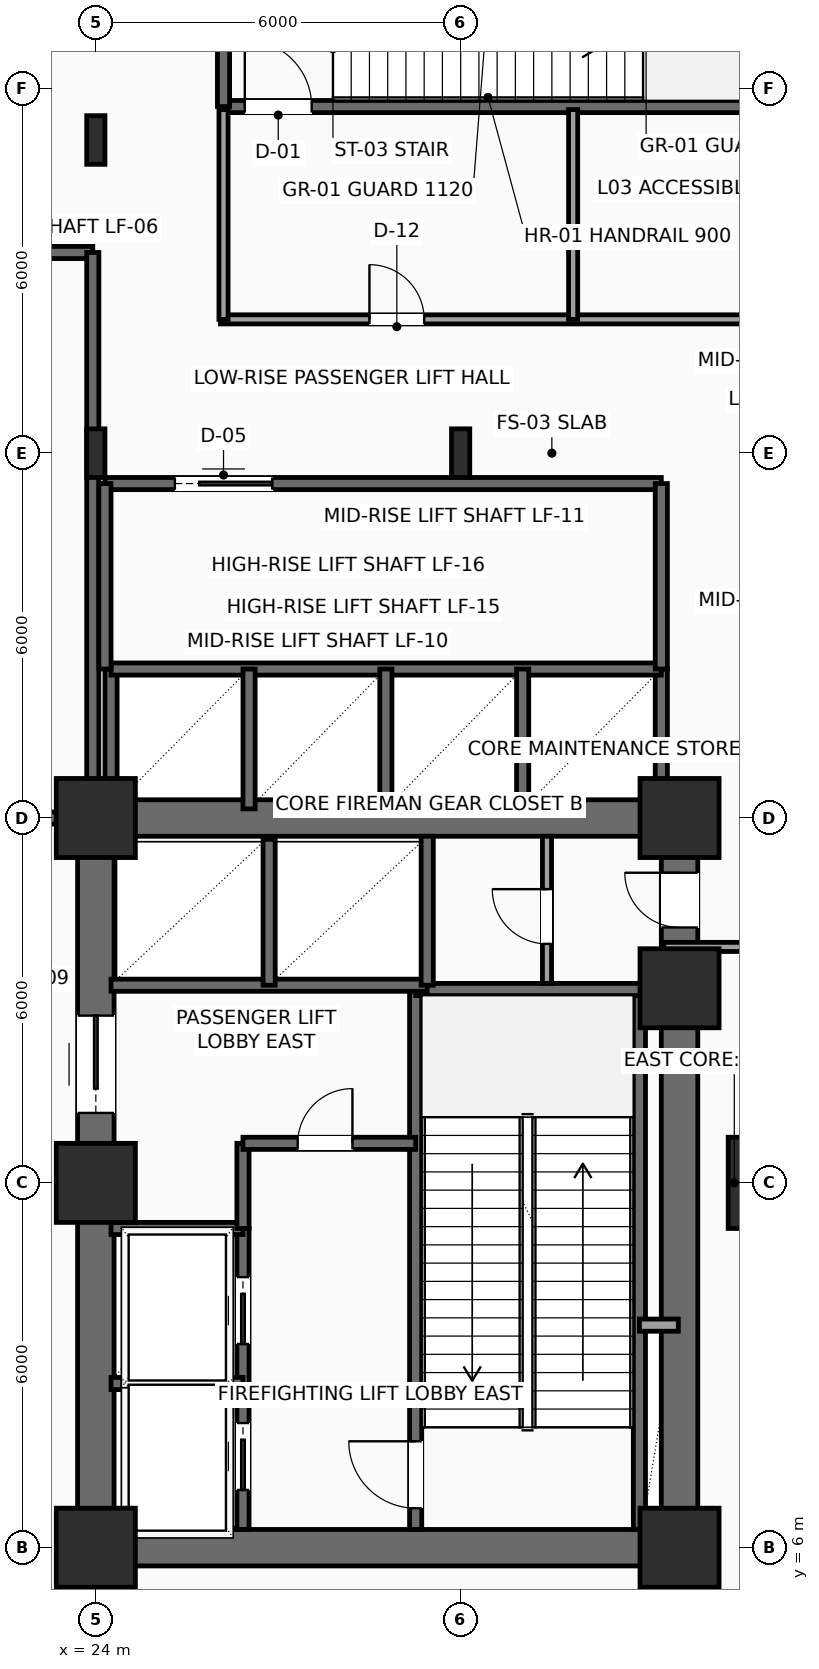
"""IFC4 building model, lengths in metres.
Left out: names, types, materials, properties, quantities, classifications, styles, units other than length and angle.
Written with IfcOpenShell. Run it as: python <this file> out.ifc"""

import sys

from ifc_helpers import new_model, si_unit, direction, frame, frame_2d, origin, origin_2d, place, context, subcontext, project, spatial, rectangle, i_section, extrude, element, fill, save


model = new_model("IFC4")
c1 = context("Model", 3, precision=1e-05, world=origin(), true_north=direction((0.0, 1.0)))
c2 = subcontext(c1, "Body", "Model", "MODEL_VIEW")
j1 = project(units=[si_unit("LENGTHUNIT", "METRE"), si_unit("PLANEANGLEUNIT", "RADIAN")], contexts=[c1])
p1 = place(None, origin())
s1 = spatial("IfcSite", under=j1, at=p1, CompositionType="ELEMENT")
p2 = place(p1, origin())
s2 = spatial("IfcBuilding", under=s1, at=p2, CompositionType="ELEMENT")
p3 = place(p2, frame((0.0, 0.0, 16.5)))
s3 = spatial("IfcBuildingStorey", under=s2, at=p3, CompositionType="ELEMENT", Elevation=16.5)
for number, where, z_axis, x_axis in (
    (1, (24.0, 6.0, 0.0), (0.0, 0.0, 1.0), (1.0, 0.0, 0.0)),
    (2, (24.0, 12.0, 0.0), (0.0, 0.0, 1.0), (1.0, 0.0, 0.0)),
    (3, (24.0, 18.0, 0.0), (0.0, 0.0, 1.0), (1.0, 0.0, 0.0)),
    (4, (33.6, 6.0, 0.0), (0.0, 0.0, 1.0), (1.0, 0.0, 0.0)),
    (5, (33.6, 15.2, 0.0), (0.0, 0.0, 1.0), (1.0, 0.0, 0.0)),
    (6, (33.6, 18.0, 0.0), (0.0, 0.0, 1.0), (1.0, 0.0, 0.0)),
):
    element("IfcColumn", number, at=place(p3, frame(where, z_axis=z_axis, x_axis=x_axis)), inside=s3, PredefinedType="COLUMN", context=c2, shape_type="SweptSolid", body=[
        extrude(rectangle(XDim=1.3, YDim=1.3, at=origin_2d()), origin(), (0.0, 0.0, 1.0), 5.4),
    ])
for number, where, z_axis, x_axis in (
    (7, (24.0, 24.0, 0.0), (0.0, 0.0, 1.0), (1.0, 0.0, 0.0)),
    (8, (24.0, 29.15, 0.0), (0.0, 0.0, 1.0), (1.0, 0.0, 0.0)),
    (9, (30.0, 24.0, 0.0), (0.0, 0.0, 1.0), (1.0, 0.0, 0.0)),
):
    element("IfcColumn", number, at=place(p3, frame(where, z_axis=z_axis, x_axis=x_axis)), inside=s3, PredefinedType="COLUMN", context=c2, shape_type="SweptSolid", body=[
        extrude(i_section(OverallWidth=0.3, OverallDepth=0.8, WebThickness=0.018, FlangeThickness=0.033, FilletRadius=0.03, at=origin_2d()), origin(), (0.0, 0.0, 1.0), 5.4),
    ])
p4 = place(p3, frame((35.15, 12.0, 0.0), z_axis=(0.0, 0.0, 1.0), x_axis=(1.0, 0.0, 0.0)))
e10 = element("IfcColumn", 10, at=p4, inside=s3, PredefinedType="COLUMN", context=c2, shape_type="SweptSolid", body=[
    extrude(rectangle(XDim=1.5, YDim=1.5, at=origin_2d()), origin(), (0.0, 0.0, 1.0), 5.4),
])
for number, where, z_axis, x_axis in (
    (11, (24.0, 6.0, 0.0), (0.0, 0.0, 1.0), (1.0, 0.0, 0.0)),
    (12, (24.0, 18.0, 0.0), (0.0, 0.0, 1.0), (1.0, 0.0, 0.0)),
):
    element("IfcWall", number, at=place(p3, frame(where, z_axis=z_axis, x_axis=x_axis)), inside=s3, PredefinedType="SHEAR", context=c2, shape_type="SweptSolid", body=[
        extrude(rectangle(XDim=9.6, YDim=0.6, at=frame_2d((4.8, 0.0))), origin(), (0.0, 0.0, 1.0), 5.125),
    ])
p5 = place(p3, frame((24.0, 6.0, 0.0), z_axis=(0.0, 0.0, 1.0), x_axis=(0.0, 1.0, 0.0)))
e13 = element("IfcWall", 13, at=p5, inside=s3, PredefinedType="SHEAR", context=c2, shape_type="SweptSolid", body=[
    extrude(rectangle(XDim=12.0, YDim=0.6, at=frame_2d((6.0, 0.0))), origin(), (0.0, 0.0, 1.0), 5.125),
])
p6 = place(p5, frame((7.15, 0.0, 0.0)))
e14 = element("IfcOpeningElement", 14, at=p6, cuts=e13, PredefinedType="OPENING", context=c2, shape_type="SweptSolid", body=[
    extrude(rectangle(XDim=1.6, YDim=2.3, at=frame_2d((0.8, 1.15))), frame((0.0, 0.31, 0.0), z_axis=(0.0, -1.0, 0.0), x_axis=(1.0, 0.0, 0.0)), (0.0, 0.0, 1.0), 0.62),
])
p7 = place(p3, frame((33.6, 6.0, 0.0), z_axis=(0.0, 0.0, 1.0), x_axis=(0.0, 1.0, 0.0)))
e15 = element("IfcWall", 15, at=p7, inside=s3, PredefinedType="SHEAR", context=c2, shape_type="SweptSolid", body=[
    extrude(rectangle(XDim=12.0, YDim=0.6, at=frame_2d((6.0, 0.0))), origin(), (0.0, 0.0, 1.0), 5.125),
])
p8 = place(p7, frame((10.2, 0.0, 0.0)))
e16 = element("IfcOpeningElement", 16, at=p8, cuts=e15, PredefinedType="OPENING", context=c2, shape_type="SweptSolid", body=[
    extrude(rectangle(XDim=0.9, YDim=2.15, at=frame_2d((0.45, 1.075))), frame((0.0, 0.31, 0.0), z_axis=(0.0, -1.0, 0.0), x_axis=(1.0, 0.0, 0.0)), (0.0, 0.0, 1.0), 0.62),
])
p9 = place(p3, frame((29.26, 6.3, 0.0), z_axis=(0.0, 0.0, 1.0), x_axis=(0.0, 1.0, 0.0)))
e17 = element("IfcWall", 17, at=p9, inside=s3, PredefinedType="SHEAR", context=c2, shape_type="SweptSolid", body=[
    extrude(rectangle(XDim=8.88, YDim=0.2, at=frame_2d((4.44, 0.0))), origin(), (0.0, 0.0, 1.0), 5.125),
])
p10 = place(p9, frame((0.35, 0.0, 0.0)))
e18 = element("IfcOpeningElement", 18, at=p10, cuts=e17, PredefinedType="OPENING", context=c2, shape_type="SweptSolid", body=[
    extrude(rectangle(XDim=1.1, YDim=2.2, at=frame_2d((0.55, 1.1))), frame((0.0, 0.11, 0.0), z_axis=(0.0, -1.0, 0.0), x_axis=(1.0, 0.0, 0.0)), (0.0, 0.0, 1.0), 0.22),
])
p11 = place(p3, frame((32.94, 6.3, 0.0), z_axis=(0.0, 0.0, 1.0), x_axis=(0.0, 1.0, 0.0)))
e19 = element("IfcWall", 19, at=p11, inside=s3, PredefinedType="SHEAR", context=c2, shape_type="SweptSolid", body=[
    extrude(rectangle(XDim=8.88, YDim=0.2, at=frame_2d((4.44, 0.0))), origin(), (0.0, 0.0, 1.0), 5.125),
])
p12 = place(p3, frame((29.26, 15.18, 0.0), z_axis=(0.0, 0.0, 1.0), x_axis=(1.0, 0.0, 0.0)))
e20 = element("IfcWall", 20, at=p12, inside=s3, PredefinedType="SHEAR", context=c2, shape_type="SweptSolid", body=[
    extrude(rectangle(XDim=4.04, YDim=0.2, at=frame_2d((2.02, 0.0))), origin(), (0.0, 0.0, 1.0), 5.125),
])
p13 = place(p3, frame((26.42, 6.3, 0.0), z_axis=(0.0, 0.0, 1.0), x_axis=(0.0, 1.0, 0.0)))
e21 = element("IfcWall", 21, at=p13, inside=s3, PredefinedType="SHEAR", context=c2, shape_type="SweptSolid", body=[
    extrude(rectangle(XDim=4.95, YDim=0.2, at=frame_2d((2.475, 0.0))), origin(), (0.0, 0.0, 1.0), 5.125),
])
p14 = place(p13, frame((0.65, 0.0, 0.0)))
e22 = element("IfcOpeningElement", 22, at=p14, cuts=e21, PredefinedType="OPENING", context=c2, shape_type="SweptSolid", body=[
    extrude(rectangle(XDim=1.1, YDim=2.2, at=frame_2d((0.55, 1.1))), frame((0.0, 0.11, 0.0), z_axis=(0.0, -1.0, 0.0), x_axis=(1.0, 0.0, 0.0)), (0.0, 0.0, 1.0), 0.22),
])
p15 = place(p13, frame((3.05, 0.0, 0.0)))
e23 = element("IfcOpeningElement", 23, at=p15, cuts=e21, PredefinedType="OPENING", context=c2, shape_type="SweptSolid", body=[
    extrude(rectangle(XDim=1.1, YDim=2.2, at=frame_2d((0.55, 1.1))), frame((0.0, 0.11, 0.0), z_axis=(0.0, -1.0, 0.0), x_axis=(1.0, 0.0, 0.0)), (0.0, 0.0, 1.0), 0.22),
])
for number, where, z_axis, x_axis in (
    (24, (24.25, 8.7, 0.0), (0.0, 0.0, 1.0), (1.0, 0.0, 0.0)),
    (25, (24.25, 11.25, 0.0), (0.0, 0.0, 1.0), (1.0, 0.0, 0.0)),
):
    element("IfcWall", number, at=place(p3, frame(where, z_axis=z_axis, x_axis=x_axis)), inside=s3, PredefinedType="SHEAR", context=c2, shape_type="SweptSolid", body=[
        extrude(rectangle(XDim=2.17, YDim=0.2, at=frame_2d((1.085, 0.0))), origin(), (0.0, 0.0, 1.0), 5.125),
    ])
p16 = place(p3, frame((26.42, 11.25, 0.0), z_axis=(0.0, 0.0, 1.0), x_axis=(0.0, 1.0, 0.0)))
e26 = element("IfcWall", 26, at=p16, inside=s3, PredefinedType="SHEAR", context=c2, shape_type="SweptSolid", body=[
    extrude(rectangle(XDim=1.4, YDim=0.2, at=frame_2d((0.7, 0.0))), origin(), (0.0, 0.0, 1.0), 5.125),
])
p17 = place(p3, frame((26.42, 12.65, 0.0), z_axis=(0.0, 0.0, 1.0), x_axis=(1.0, 0.0, 0.0)))
e27 = element("IfcWall", 27, at=p17, inside=s3, PredefinedType="SHEAR", context=c2, shape_type="SweptSolid", body=[
    extrude(rectangle(XDim=2.84, YDim=0.2, at=frame_2d((1.42, 0.0))), origin(), (0.0, 0.0, 1.0), 5.125),
])
p18 = place(p17, frame((0.9, 0.0, 0.0)))
e28 = element("IfcOpeningElement", 28, at=p18, cuts=e27, PredefinedType="OPENING", context=c2, shape_type="SweptSolid", body=[
    extrude(rectangle(XDim=0.9, YDim=2.15, at=frame_2d((0.45, 1.075))), frame((0.0, 0.11, 0.0), z_axis=(0.0, -1.0, 0.0), x_axis=(1.0, 0.0, 0.0)), (0.0, 0.0, 1.0), 0.22),
])
p19 = place(p3, frame((32.94, 9.66, 0.0), z_axis=(0.0, 0.0, 1.0), x_axis=(1.0, 0.0, 0.0)))
e29 = element("IfcWall", 29, at=p19, inside=s3, PredefinedType="SOLIDWALL", context=c2, shape_type="SweptSolid", body=[
    extrude(rectangle(XDim=0.64, YDim=0.2, at=frame_2d((0.32, 0.0))), origin(), (0.0, 0.0, 1.0), 5.125),
])
p20 = place(p3, frame((24.25, 15.25, 0.0), z_axis=(0.0, 0.0, 1.0), x_axis=(1.0, 0.0, 0.0)))
e30 = element("IfcWall", 30, at=p20, inside=s3, PredefinedType="SHEAR", context=c2, shape_type="SweptSolid", body=[
    extrude(rectangle(XDim=5.2, YDim=0.2, at=frame_2d((2.6, 0.0))), origin(), (0.0, 0.0, 1.0), 5.125),
])
p21 = place(p3, frame((26.85, 15.25, 0.0), z_axis=(0.0, 0.0, 1.0), x_axis=(0.0, 1.0, 0.0)))
e31 = element("IfcWall", 31, at=p21, inside=s3, PredefinedType="SHEAR", context=c2, shape_type="SweptSolid", body=[
    extrude(rectangle(XDim=2.4, YDim=0.2, at=frame_2d((1.2, 0.0))), origin(), (0.0, 0.0, 1.0), 5.125),
])
p22 = place(p3, frame((29.45, 15.25, 0.0), z_axis=(0.0, 0.0, 1.0), x_axis=(0.0, 1.0, 0.0)))
e32 = element("IfcWall", 32, at=p22, inside=s3, PredefinedType="SHEAR", context=c2, shape_type="SweptSolid", body=[
    extrude(rectangle(XDim=2.45, YDim=0.2, at=frame_2d((1.225, 0.0))), origin(), (0.0, 0.0, 1.0), 5.125),
])
p23 = place(p3, frame((31.42, 15.28, 0.0), z_axis=(0.0, 0.0, 1.0), x_axis=(0.0, 1.0, 0.0)))
e33 = element("IfcWall", 33, at=p23, inside=s3, PredefinedType="PARTITIONING", context=c2, shape_type="SweptSolid", body=[
    extrude(rectangle(XDim=2.42, YDim=0.15, at=frame_2d((1.21, 0.0))), origin(), (0.0, 0.0, 1.0), 5.125),
])
p24 = place(p23, frame((0.65, 0.0, 0.0)))
e34 = element("IfcOpeningElement", 34, at=p24, cuts=e33, PredefinedType="OPENING", context=c2, shape_type="SweptSolid", body=[
    extrude(rectangle(XDim=0.9, YDim=2.15, at=frame_2d((0.45, 1.075))), frame((0.0, 0.085, 0.0), z_axis=(0.0, -1.0, 0.0), x_axis=(1.0, 0.0, 0.0)), (0.0, 0.0, 1.0), 0.17),
])
p25 = place(p3, frame((20.45, 18.0, 0.0), z_axis=(0.0, 0.0, 1.0), x_axis=(1.0, 0.0, 0.0)))
e35 = element("IfcWall", 35, at=p25, inside=s3, PredefinedType="SHEAR", context=c2, shape_type="SweptSolid", body=[
    extrude(rectangle(XDim=3.5, YDim=0.2, at=frame_2d((1.75, 0.0))), origin(), (0.0, 0.0, 1.0), 5.125),
])
p26 = place(p25, frame((0.95, 0.0, 0.0)))
e36 = element("IfcOpeningElement", 36, at=p26, cuts=e35, PredefinedType="OPENING", context=c2, shape_type="SweptSolid", body=[
    extrude(rectangle(XDim=1.6, YDim=2.3, at=frame_2d((0.8, 1.15))), frame((0.0, 0.11, 0.0), z_axis=(0.0, -1.0, 0.0), x_axis=(1.0, 0.0, 0.0)), (0.0, 0.0, 1.0), 0.22),
])
p27 = place(p3, frame((20.45, 27.3, 0.0), z_axis=(0.0, 0.0, 1.0), x_axis=(1.0, 0.0, 0.0)))
e37 = element("IfcWall", 37, at=p27, inside=s3, PredefinedType="SHEAR", context=c2, shape_type="SweptSolid", body=[
    extrude(rectangle(XDim=3.5, YDim=0.2, at=frame_2d((1.75, 0.0))), origin(), (0.0, 0.0, 1.0), 5.125),
])
p28 = place(p3, frame((23.95, 18.0, 0.0), z_axis=(0.0, 0.0, 1.0), x_axis=(0.0, 1.0, 0.0)))
e38 = element("IfcWall", 38, at=p28, inside=s3, PredefinedType="SHEAR", context=c2, shape_type="SweptSolid", body=[
    extrude(rectangle(XDim=9.3, YDim=0.2, at=frame_2d((4.65, 0.0))), origin(), (0.0, 0.0, 1.0), 5.125),
])
for number, where, z_axis, x_axis in (
    (39, (33.3, 18.1, 0.0), (0.0, 0.0, 1.0), (0.0, 1.0, 0.0)),
    (40, (24.25, 18.1, 0.0), (0.0, 0.0, 1.0), (0.0, 1.0, 0.0)),
):
    element("IfcWall", number, at=place(p3, frame(where, z_axis=z_axis, x_axis=x_axis)), inside=s3, PredefinedType="SHEAR", context=c2, shape_type="SweptSolid", body=[
        extrude(rectangle(XDim=2.35, YDim=0.2, at=frame_2d((1.175, 0.0))), origin(), (0.0, 0.0, 1.0), 5.125),
    ])
p29 = place(p3, frame((24.25, 20.45, 0.0), z_axis=(0.0, 0.0, 1.0), x_axis=(1.0, 0.0, 0.0)))
e41 = element("IfcWall", 41, at=p29, inside=s3, PredefinedType="SHEAR", context=c2, shape_type="SweptSolid", body=[
    extrude(rectangle(XDim=9.05, YDim=0.2, at=frame_2d((4.525, 0.0))), origin(), (0.0, 0.0, 1.0), 5.125),
])
for number, where, z_axis, x_axis in (
    (42, (26.52, 18.15, 0.0), (0.0, 0.0, 1.0), (0.0, 1.0, 0.0)),
    (43, (28.77, 18.15, 0.0), (0.0, 0.0, 1.0), (0.0, 1.0, 0.0)),
    (44, (31.02, 18.15, 0.0), (0.0, 0.0, 1.0), (0.0, 1.0, 0.0)),
):
    element("IfcWall", number, at=place(p3, frame(where, z_axis=z_axis, x_axis=x_axis)), inside=s3, PredefinedType="SHEAR", context=c2, shape_type="SweptSolid", body=[
        extrude(rectangle(XDim=2.3, YDim=0.2, at=frame_2d((1.15, 0.0))), origin(), (0.0, 0.0, 1.0), 5.125),
    ])
p30 = place(p3, frame((24.15, 23.5, 0.0), z_axis=(0.0, 0.0, 1.0), x_axis=(1.0, 0.0, 0.0)))
e45 = element("IfcWall", 45, at=p30, inside=s3, PredefinedType="SHEAR", context=c2, shape_type="SweptSolid", body=[
    extrude(rectangle(XDim=9.15, YDim=0.2, at=frame_2d((4.575, 0.0))), origin(), (0.0, 0.0, 1.0), 5.125),
])
p31 = place(p30, frame((1.15, 0.0, 0.0)))
e46 = element("IfcOpeningElement", 46, at=p31, cuts=e45, PredefinedType="OPENING", context=c2, shape_type="SweptSolid", body=[
    extrude(rectangle(XDim=1.6, YDim=2.3, at=frame_2d((0.8, 1.15))), frame((0.0, 0.11, 0.0), z_axis=(0.0, -1.0, 0.0), x_axis=(1.0, 0.0, 0.0)), (0.0, 0.0, 1.0), 0.22),
])
for number, where, z_axis, x_axis in (
    (47, (33.3, 20.45, 0.0), (0.0, 0.0, 1.0), (0.0, 1.0, 0.0)),
    (48, (24.15, 20.45, 0.0), (0.0, 0.0, 1.0), (0.0, 1.0, 0.0)),
):
    element("IfcWall", number, at=place(p3, frame(where, z_axis=z_axis, x_axis=x_axis)), inside=s3, PredefinedType="SHEAR", context=c2, shape_type="SweptSolid", body=[
        extrude(rectangle(XDim=3.05, YDim=0.2, at=frame_2d((1.525, 0.0))), origin(), (0.0, 0.0, 1.0), 5.125),
    ])
p32 = place(p3, frame((26.1, 29.7, 0.0), z_axis=(0.0, 0.0, 1.0), x_axis=(1.0, 0.0, 0.0)))
e49 = element("IfcWall", 49, at=p32, inside=s3, PredefinedType="SHEAR", context=c2, shape_type="SweptSolid", body=[
    extrude(rectangle(XDim=9.05, YDim=0.2, at=frame_2d((4.525, 0.0))), origin(), (0.0, 0.0, 1.0), 5.125),
])
p33 = place(p32, frame((0.35, 0.0, 0.0)))
e50 = element("IfcOpeningElement", 50, at=p33, cuts=e49, PredefinedType="OPENING", context=c2, shape_type="SweptSolid", body=[
    extrude(rectangle(XDim=1.1, YDim=2.2, at=frame_2d((0.55, 1.1))), frame((0.0, 0.11, 0.0), z_axis=(0.0, -1.0, 0.0), x_axis=(1.0, 0.0, 0.0)), (0.0, 0.0, 1.0), 0.22),
])
p34 = place(p3, frame((26.1, 29.7, 0.0), z_axis=(0.0, 0.0, 1.0), x_axis=(0.0, 1.0, 0.0)))
e51 = element("IfcWall", 51, at=p34, inside=s3, PredefinedType="SHEAR", context=c2, shape_type="SweptSolid", body=[
    extrude(rectangle(XDim=3.76, YDim=0.2, at=frame_2d((1.88, 0.0))), origin(), (0.0, 0.0, 1.0), 5.125),
])
p35 = place(p3, frame((36.15, 15.88, 0.0), z_axis=(0.0, 0.0, 1.0), x_axis=(-1.0, 0.0, 0.0)))
e52 = element("IfcWall", 52, at=p35, inside=s3, PredefinedType="PARTITIONING", context=c2, shape_type="SweptSolid", body=[
    extrude(rectangle(XDim=2.81, YDim=0.15, at=frame_2d((1.405, 0.0))), origin(), (0.0, 0.0, 1.0), 5.125),
])
p36 = place(p3, frame((26.05, 26.2, 0.0), z_axis=(0.0, 0.0, 1.0), x_axis=(1.0, 0.0, 0.0)))
e53 = element("IfcWall", 53, at=p36, inside=s3, PredefinedType="PARTITIONING", context=c2, shape_type="SweptSolid", body=[
    extrude(rectangle(XDim=33.55, YDim=0.15, at=frame_2d((16.775, 0.0))), origin(), (0.0, 0.0, 1.0), 5.125),
])
p37 = place(p36, frame((2.45, 0.0, 0.0)))
e54 = element("IfcOpeningElement", 54, at=p37, cuts=e53, PredefinedType="OPENING", context=c2, shape_type="SweptSolid", body=[
    extrude(rectangle(XDim=0.9, YDim=2.1, at=frame_2d((0.45, 1.05))), frame((0.0, 0.085, 0.0), z_axis=(0.0, -1.0, 0.0), x_axis=(1.0, 0.0, 0.0)), (0.0, 0.0, 1.0), 0.17),
])
p38 = place(p36, frame((14.5, 0.0, 0.0)))
e55 = element("IfcOpeningElement", 55, at=p38, cuts=e53, PredefinedType="OPENING", context=c2, shape_type="SweptSolid", body=[
    extrude(rectangle(XDim=0.95, YDim=2.15, at=frame_2d((0.475, 1.075))), frame((0.0, 0.085, 0.0), z_axis=(0.0, -1.0, 0.0), x_axis=(1.0, 0.0, 0.0)), (0.0, 0.0, 1.0), 0.17),
])
p39 = place(p36, frame((24.275, 0.0, 0.0)))
e56 = element("IfcOpeningElement", 56, at=p39, cuts=e53, PredefinedType="OPENING", context=c2, shape_type="SweptSolid", body=[
    extrude(rectangle(XDim=0.95, YDim=2.15, at=frame_2d((0.475, 1.075))), frame((0.0, 0.085, 0.0), z_axis=(0.0, -1.0, 0.0), x_axis=(1.0, 0.0, 0.0)), (0.0, 0.0, 1.0), 0.17),
])
p40 = place(p36, frame((30.675, 0.0, 0.0)))
e57 = element("IfcOpeningElement", 57, at=p40, cuts=e53, PredefinedType="OPENING", context=c2, shape_type="SweptSolid", body=[
    extrude(rectangle(XDim=0.95, YDim=2.15, at=frame_2d((0.475, 1.075))), frame((0.0, 0.085, 0.0), z_axis=(0.0, -1.0, 0.0), x_axis=(1.0, 0.0, 0.0)), (0.0, 0.0, 1.0), 0.17),
])
for number, where, z_axis, x_axis in (
    (58, (26.1, 26.2, 0.0), (0.0, 0.0, 1.0), (0.0, 1.0, 0.0)),
    (59, (31.85, 26.2, 0.0), (0.0, 0.0, 1.0), (0.0, 1.0, 0.0)),
):
    element("IfcWall", number, at=place(p3, frame(where, z_axis=z_axis, x_axis=x_axis)), inside=s3, PredefinedType="PARTITIONING", context=c2, shape_type="SweptSolid", body=[
        extrude(rectangle(XDim=3.45, YDim=0.15, at=frame_2d((1.725, 0.0))), origin(), (0.0, 0.0, 1.0), 5.125),
    ])
p41 = place(p6, origin())
e60 = element("IfcDoor", 60, at=p41, inside=s3, OperationType="DOUBLE_DOOR_SLIDING", PredefinedType="DOOR", context=c2, shape_type="SweptSolid", body=[
    extrude(rectangle(XDim=1.6, YDim=2.3, at=frame_2d((0.8, 1.15))), frame((0.0, 0.025, 0.0), z_axis=(0.0, -1.0, 0.0), x_axis=(1.0, 0.0, 0.0)), (0.0, 0.0, 1.0), 0.05),
])
fill(e14, e60)
p42 = place(p8, origin())
e61 = element("IfcDoor", 61, at=p42, inside=s3, OperationType="SINGLE_SWING_RIGHT", PredefinedType="DOOR", context=c2, shape_type="SweptSolid", body=[
    extrude(rectangle(XDim=0.9, YDim=2.15, at=frame_2d((0.45, 1.075))), frame((0.0, 0.025, 0.0), z_axis=(0.0, -1.0, 0.0), x_axis=(1.0, 0.0, 0.0)), (0.0, 0.0, 1.0), 0.05),
])
fill(e16, e61)
p43 = place(p10, origin())
e62 = element("IfcDoor", 62, at=p43, inside=s3, OperationType="SINGLE_SWING_RIGHT", PredefinedType="DOOR", context=c2, shape_type="SweptSolid", body=[
    extrude(rectangle(XDim=1.1, YDim=2.2, at=frame_2d((0.55, 1.1))), frame((0.0, 0.025, 0.0), z_axis=(0.0, -1.0, 0.0), x_axis=(1.0, 0.0, 0.0)), (0.0, 0.0, 1.0), 0.05),
])
fill(e18, e62)
p44 = place(p14, origin())
e63 = element("IfcDoor", 63, at=p44, inside=s3, OperationType="SLIDING_TO_LEFT", PredefinedType="DOOR", context=c2, shape_type="SweptSolid", body=[
    extrude(rectangle(XDim=1.1, YDim=2.2, at=frame_2d((0.55, 1.1))), frame((0.0, 0.025, 0.0), z_axis=(0.0, -1.0, 0.0), x_axis=(1.0, 0.0, 0.0)), (0.0, 0.0, 1.0), 0.05),
])
fill(e22, e63)
p45 = place(p15, origin())
e64 = element("IfcDoor", 64, at=p45, inside=s3, OperationType="SLIDING_TO_LEFT", PredefinedType="DOOR", context=c2, shape_type="SweptSolid", body=[
    extrude(rectangle(XDim=1.1, YDim=2.2, at=frame_2d((0.55, 1.1))), frame((0.0, 0.025, 0.0), z_axis=(0.0, -1.0, 0.0), x_axis=(1.0, 0.0, 0.0)), (0.0, 0.0, 1.0), 0.05),
])
fill(e23, e64)
p46 = place(p18, origin())
e65 = element("IfcDoor", 65, at=p46, inside=s3, OperationType="SINGLE_SWING_RIGHT", PredefinedType="DOOR", context=c2, shape_type="SweptSolid", body=[
    extrude(rectangle(XDim=0.9, YDim=2.15, at=frame_2d((0.45, 1.075))), frame((0.0, 0.025, 0.0), z_axis=(0.0, -1.0, 0.0), x_axis=(1.0, 0.0, 0.0)), (0.0, 0.0, 1.0), 0.05),
])
fill(e28, e65)
p47 = place(p24, origin())
e66 = element("IfcDoor", 66, at=p47, inside=s3, OperationType="SINGLE_SWING_RIGHT", PredefinedType="DOOR", context=c2, shape_type="SweptSolid", body=[
    extrude(rectangle(XDim=0.9, YDim=2.15, at=frame_2d((0.45, 1.075))), frame((0.0, 0.025, 0.0), z_axis=(0.0, -1.0, 0.0), x_axis=(1.0, 0.0, 0.0)), (0.0, 0.0, 1.0), 0.05),
])
fill(e34, e66)
p48 = place(p31, origin())
e67 = element("IfcDoor", 67, at=p48, inside=s3, OperationType="DOUBLE_DOOR_SLIDING", PredefinedType="DOOR", context=c2, shape_type="SweptSolid", body=[
    extrude(rectangle(XDim=1.6, YDim=2.3, at=frame_2d((0.8, 1.15))), frame((0.0, 0.025, 0.0), z_axis=(0.0, -1.0, 0.0), x_axis=(1.0, 0.0, 0.0)), (0.0, 0.0, 1.0), 0.05),
])
fill(e46, e67)
p49 = place(p33, origin())
e68 = element("IfcDoor", 68, at=p49, inside=s3, OperationType="SINGLE_SWING_LEFT", PredefinedType="DOOR", context=c2, shape_type="SweptSolid", body=[
    extrude(rectangle(XDim=1.1, YDim=2.2, at=frame_2d((0.55, 1.1))), frame((0.0, 0.025, 0.0), z_axis=(0.0, -1.0, 0.0), x_axis=(1.0, 0.0, 0.0)), (0.0, 0.0, 1.0), 0.05),
])
fill(e50, e68)
p50 = place(p37, origin())
e69 = element("IfcDoor", 69, at=p50, inside=s3, OperationType="SINGLE_SWING_LEFT", PredefinedType="DOOR", context=c2, shape_type="SweptSolid", body=[
    extrude(rectangle(XDim=0.9, YDim=2.1, at=frame_2d((0.45, 1.05))), frame((0.0, 0.025, 0.0), z_axis=(0.0, -1.0, 0.0), x_axis=(1.0, 0.0, 0.0)), (0.0, 0.0, 1.0), 0.05),
])
fill(e54, e69)
save(model, sys.argv[1])
